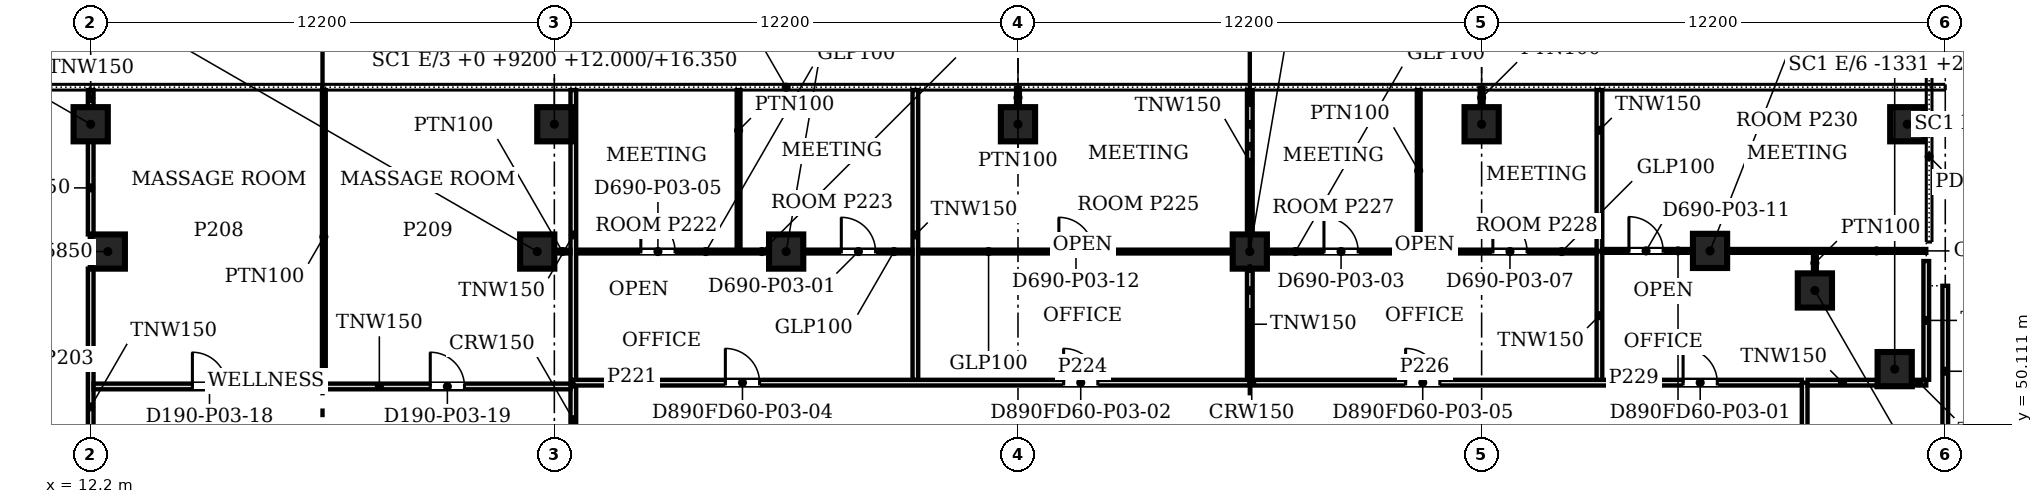
"""IFC4 building model, lengths in metres.
Left out: names, types, materials, properties, quantities, classifications, styles, units other than length and angle.
Written with IfcOpenShell. Run it as: python <this file> out.ifc"""

import sys

from ifc_helpers import new_model, si_unit, direction, frame, frame_2d, origin, origin_2d, place, context, subcontext, project, spatial, rectangle, extrude, source, transform, mapped, element, fill, save


model = new_model("IFC4")
c1 = context("Model", 3, precision=1e-05, world=origin(), true_north=direction((0.0, 1.0)))
c2 = subcontext(c1, "Body", "Model", "MODEL_VIEW")
j1 = project(units=[si_unit("LENGTHUNIT", "METRE"), si_unit("PLANEANGLEUNIT", "RADIAN")], contexts=[c1])
p1 = place(None, origin())
s1 = spatial("IfcSite", under=j1, at=p1, CompositionType="ELEMENT")
p2 = place(p1, origin())
s2 = spatial("IfcBuilding", under=s1, at=p2, CompositionType="ELEMENT")
p3 = place(p2, frame((0.0, 0.0, 12.0)))
s3 = spatial("IfcBuildingStorey", under=s2, at=p3, CompositionType="ELEMENT", Elevation=12.0)
for number, where, z_axis, x_axis in (
    (1, (12.65, 54.65, 0.0), (0.0, 0.0, 1.0), (1.0, 0.0, 0.0)),
    (2, (23.95, 54.65, 0.0), (0.0, 0.0, 1.0), (1.0, 0.0, 0.0)),
    (3, (59.669, 51.556, 0.0), (0.0, 0.0, 1.0), (1.0, 0.0, 0.0)),
    (4, (57.569, 53.626, 0.0), (0.0, 0.0, 1.0), (1.0, 0.0, 0.0)),
    (5, (54.81, 54.667, 0.0), (0.0, 0.0, 1.0), (1.0, 0.0, 0.0)),
    (6, (42.7, 54.65, 0.0), (0.0, 0.0, 1.0), (1.0, 0.0, 0.0)),
    (7, (30.5, 54.65, 0.0), (0.0, 0.0, 1.0), (1.0, 0.0, 0.0)),
):
    element("IfcColumn", number, at=place(p3, frame(where, z_axis=z_axis, x_axis=x_axis)), inside=s3, PredefinedType="COLUMN", context=c2, shape_type="SweptSolid", body=[
        extrude(rectangle(XDim=0.9, YDim=0.9, at=origin_2d()), origin(), (0.0, 0.0, 1.0), 4.6),
    ])
for number, where, z_axis, x_axis in (
    (8, (12.2, 58.0, 0.0), (0.0, 0.0, 1.0), (1.0, 0.0, 0.0)),
    (9, (24.4, 58.0, 0.0), (0.0, 0.0, 1.0), (1.0, 0.0, 0.0)),
    (10, (36.6, 58.0, 0.0), (0.0, 0.0, 1.0), (1.0, 0.0, 0.0)),
    (11, (48.8, 58.0, 0.0), (0.0, 0.0, 1.0), (1.0, 0.0, 0.0)),
    (12, (61.0, 54.2, 0.0), (0.0, 0.0, 1.0), (1.0, 0.0, 0.0)),
    (13, (60.0, 58.0, 0.0), (0.0, 0.0, 1.0), (1.0, 0.0, 0.0)),
):
    element("IfcColumn", number, at=place(p3, frame(where, z_axis=z_axis, x_axis=x_axis)), inside=s3, PredefinedType="COLUMN", context=c2, shape_type="SweptSolid", body=[
        extrude(rectangle(XDim=0.9, YDim=0.9, at=origin_2d()), origin(), (0.0, 0.0, 1.0), 4.35),
    ])
p4 = place(p3, frame((57.3, 39.1, 0.0), z_axis=(0.0, 0.0, 1.0), x_axis=(0.0, 1.0, 0.0)))
e14 = element("IfcWall", 14, at=p4, inside=s3, PredefinedType="PARTITIONING", context=c2, shape_type="SweptSolid", body=[
    extrude(rectangle(XDim=12.1, YDim=0.15, at=frame_2d((6.05, 0.0))), origin(), (0.0, 0.0, 1.0), 3.672),
])
p5 = place(p3, frame((61.0, 49.251, 0.0), z_axis=(0.0, 0.0, 1.0), x_axis=(0.0, 1.0, 0.0)))
e15 = element("IfcWall", 15, at=p5, inside=s3, PredefinedType="PARTITIONING", context=c2, shape_type="SweptSolid", body=[
    extrude(rectangle(XDim=4.498, YDim=0.15, at=frame_2d((2.249, 0.0))), origin(), (0.0, 0.0, 1.0), 3.672),
])
p6 = place(p3, frame((12.2, 49.351, 0.0), z_axis=(0.0, 0.0, 1.0), x_axis=(0.0, 1.0, 0.0)))
e16 = element("IfcWall", 16, at=p6, inside=s3, PredefinedType="PARTITIONING", context=c2, shape_type="SweptSolid", body=[
    extrude(rectangle(XDim=4.848, YDim=0.15, at=frame_2d((2.424, 0.0))), origin(), (0.0, 0.0, 1.0), 3.672),
])
p7 = place(p3, frame((24.9, 49.351, 0.0), z_axis=(0.0, 0.0, 1.0), x_axis=(0.0, 1.0, 0.0)))
e17 = element("IfcWall", 17, at=p7, inside=s3, PredefinedType="PARTITIONING", context=c2, shape_type="SweptSolid", body=[
    extrude(rectangle(XDim=1.749, YDim=0.15, at=frame_2d((0.875, 0.0))), origin(), (0.0, 0.0, 1.0), 3.672),
])
p8 = place(p3, frame((12.276, 51.1, 0.0), z_axis=(0.0, 0.0, 1.0), x_axis=(1.0, 0.0, 0.0)))
e18 = element("IfcWall", 18, at=p8, inside=s3, PredefinedType="PARTITIONING", context=c2, shape_type="SweptSolid", body=[
    extrude(rectangle(XDim=12.548, YDim=0.15, at=frame_2d((6.274, 0.0))), origin(), (0.0, 0.0, 1.0), 3.672),
])
m1 = source(origin(), c2, "Body", "SweptSolid", [
    extrude(rectangle(XDim=0.9, YDim=2.1, at=frame_2d((0.45, 1.05))), frame((0.0, 0.085, 0.0), z_axis=(0.0, -1.0, 0.0), x_axis=(1.0, 0.0, 0.0)), (0.0, 0.0, 1.0), 0.17),
])
p9 = place(p8, frame((2.6, 0.0, 0.0)))
e19 = element("IfcOpeningElement", 19, at=p9, cuts=e18, PredefinedType="OPENING", context=c2, shape_type="MappedRepresentation", body=[
    mapped(m1, transform((0.0, 0.0, 0.0), scale=1.0)),
])
p10 = place(p8, frame((8.859, 0.0, 0.0)))
e20 = element("IfcOpeningElement", 20, at=p10, cuts=e18, PredefinedType="OPENING", context=c2, shape_type="MappedRepresentation", body=[
    mapped(m1, transform((0.0, 0.0, 0.0), scale=1.0)),
])
p11 = place(p3, frame((18.335, 51.176, 0.0), z_axis=(0.0, 0.0, 1.0), x_axis=(0.0, 1.0, 0.0)))
e21 = element("IfcWall", 21, at=p11, inside=s3, PredefinedType="PARTITIONING", context=c2, shape_type="SweptSolid", body=[
    extrude(rectangle(XDim=7.724, YDim=0.1, at=frame_2d((3.862, 0.0))), origin(), (0.0, 0.0, 1.0), 3.672),
])
p12 = place(p3, frame((24.9, 51.2, 0.0), z_axis=(0.0, 0.0, 1.0), x_axis=(1.0, 0.0, 0.0)))
e22 = element("IfcWall", 22, at=p12, inside=s3, PredefinedType="PARTITIONING", context=c2, shape_type="SweptSolid", body=[
    extrude(rectangle(XDim=32.324, YDim=0.15, at=frame_2d((16.162, 0.0))), origin(), (0.0, 0.0, 1.0), 3.672),
])
p13 = place(p12, frame((29.201, 0.0, 0.0)))
e23 = element("IfcOpeningElement", 23, at=p13, cuts=e22, PredefinedType="OPENING", context=c2, shape_type="MappedRepresentation", body=[
    mapped(m1, transform((0.0, 0.0, 0.0), scale=1.0)),
])
p14 = place(p12, frame((12.901, 0.0, 0.0)))
e24 = element("IfcOpeningElement", 24, at=p14, cuts=e22, PredefinedType="OPENING", context=c2, shape_type="MappedRepresentation", body=[
    mapped(m1, transform((0.0, 0.0, 0.0), scale=1.0)),
])
p15 = place(p12, frame((4.0, 0.0, 0.0)))
e25 = element("IfcOpeningElement", 25, at=p15, cuts=e22, PredefinedType="OPENING", context=c2, shape_type="MappedRepresentation", body=[
    mapped(m1, transform((0.0, 0.0, 0.0), scale=1.0)),
])
p16 = place(p12, frame((21.9, 0.0, 0.0)))
e26 = element("IfcOpeningElement", 26, at=p16, cuts=e22, PredefinedType="OPENING", context=c2, shape_type="MappedRepresentation", body=[
    mapped(m1, transform((0.0, 0.0, 0.0), scale=1.0)),
])
p17 = place(p3, frame((57.376, 51.2, 0.0), z_axis=(0.0, 0.0, 1.0), x_axis=(1.0, 0.0, 0.0)))
e27 = element("IfcWall", 27, at=p17, inside=s3, PredefinedType="PARTITIONING", context=c2, shape_type="SweptSolid", body=[
    extrude(rectangle(XDim=1.842, YDim=0.15, at=frame_2d((0.921, 0.0))), origin(), (0.0, 0.0, 1.0), 3.672),
])
p18 = place(p3, frame((60.12, 51.2, 0.0), z_axis=(0.0, 0.0, 1.0), x_axis=(1.0, 0.0, 0.0)))
e28 = element("IfcWall", 28, at=p18, inside=s3, PredefinedType="PARTITIONING", context=c2, shape_type="SweptSolid", body=[
    extrude(rectangle(XDim=0.38, YDim=0.15, at=frame_2d((0.19, 0.0))), origin(), (0.0, 0.0, 1.0), 3.672),
])
for number, where, z_axis, x_axis in (
    (29, (24.9, 51.276, 0.0), (0.0, 0.0, 1.0), (0.0, 1.0, 0.0)),
    (30, (33.9, 51.276, 0.0), (0.0, 0.0, 1.0), (0.0, 1.0, 0.0)),
):
    element("IfcWall", number, at=place(p3, frame(where, z_axis=z_axis, x_axis=x_axis)), inside=s3, PredefinedType="PARTITIONING", context=c2, shape_type="SweptSolid", body=[
        extrude(rectangle(XDim=7.624, YDim=0.15, at=frame_2d((3.812, 0.0))), origin(), (0.0, 0.0, 1.0), 3.672),
    ])
p19 = place(p3, frame((42.7, 51.276, 0.0), z_axis=(0.0, 0.0, 1.0), x_axis=(0.0, 1.0, 0.0)))
e31 = element("IfcWall", 31, at=p19, inside=s3, PredefinedType="PARTITIONING", context=c2, shape_type="SweptSolid", body=[
    extrude(rectangle(XDim=2.923, YDim=0.15, at=frame_2d((1.461, 0.0))), origin(), (0.0, 0.0, 1.0), 3.672),
])
p20 = place(p3, frame((51.9, 51.276, 0.0), z_axis=(0.0, 0.0, 1.0), x_axis=(0.0, 1.0, 0.0)))
e32 = element("IfcWall", 32, at=p20, inside=s3, PredefinedType="PARTITIONING", context=c2, shape_type="SweptSolid", body=[
    extrude(rectangle(XDim=3.374, YDim=0.15, at=frame_2d((1.687, 0.0))), origin(), (0.0, 0.0, 1.0), 3.672),
])
p21 = place(p3, frame((60.5, 51.276, 0.0), z_axis=(0.0, 0.0, 1.0), x_axis=(0.0, 1.0, 0.0)))
e33 = element("IfcWall", 33, at=p21, inside=s3, PredefinedType="PARTITIONING", context=c2, shape_type="SweptSolid", body=[
    extrude(rectangle(XDim=3.124, YDim=0.15, at=frame_2d((1.562, 0.0))), origin(), (0.0, 0.0, 1.0), 3.672),
])
p22 = place(p3, frame((57.569, 54.076, 0.0), z_axis=(0.0, 0.0, 1.0), x_axis=(0.0, 1.0, 0.0)))
e34 = element("IfcWall", 34, at=p22, inside=s3, PredefinedType="PARTITIONING", context=c2, shape_type="SweptSolid", body=[
    extrude(rectangle(XDim=0.541, YDim=0.1, at=frame_2d((0.271, 0.0))), origin(), (0.0, 0.0, 1.0), 3.672),
])
p23 = place(p3, frame((24.4, 54.65, 0.0), z_axis=(0.0, 0.0, 1.0), x_axis=(1.0, 0.0, 0.0)))
e35 = element("IfcWall", 35, at=p23, inside=s3, PredefinedType="PARTITIONING", context=c2, shape_type="SweptSolid", body=[
    extrude(rectangle(XDim=0.425, YDim=0.1, at=frame_2d((0.212, 0.0))), origin(), (0.0, 0.0, 1.0), 3.672),
])
p24 = place(p3, frame((24.976, 54.65, 0.0), z_axis=(0.0, 0.0, 1.0), x_axis=(1.0, 0.0, 0.0)))
e36 = element("IfcWall", 36, at=p24, inside=s3, PredefinedType="PARTITIONING", context=c2, shape_type="SweptSolid", body=[
    extrude(rectangle(XDim=4.221, YDim=0.1, at=frame_2d((2.11, 0.0))), origin(), (0.0, 0.0, 1.0), 3.672),
])
m2 = source(origin(), c2, "Body", "SweptSolid", [
    extrude(rectangle(XDim=0.9, YDim=2.1, at=frame_2d((0.45, 1.05))), frame((0.0, 0.06, 0.0), z_axis=(0.0, -1.0, 0.0), x_axis=(1.0, 0.0, 0.0)), (0.0, 0.0, 1.0), 0.12),
])
p25 = place(p24, frame((1.7, 0.0, 0.0)))
e37 = element("IfcOpeningElement", 37, at=p25, cuts=e36, PredefinedType="OPENING", context=c2, shape_type="MappedRepresentation", body=[
    mapped(m2, transform((0.0, 0.0, 0.0), scale=1.0)),
])
p26 = place(p3, frame((29.248, 54.65, 0.0), z_axis=(0.0, 0.0, 1.0), x_axis=(0.0, 1.0, 0.0)))
e38 = element("IfcWall", 38, at=p26, inside=s3, PredefinedType="PARTITIONING", context=c2, shape_type="SweptSolid", body=[
    extrude(rectangle(XDim=4.25, YDim=0.1, at=frame_2d((2.125, 0.0))), origin(), (0.0, 0.0, 1.0), 3.672),
])
p27 = place(p3, frame((29.299, 54.65, 0.0), z_axis=(0.0, 0.0, 1.0), x_axis=(1.0, 0.0, 0.0)))
e39 = element("IfcWall", 39, at=p27, inside=s3, PredefinedType="PARTITIONING", context=c2, shape_type="SweptSolid", body=[
    extrude(rectangle(XDim=0.75, YDim=0.1, at=frame_2d((0.375, 0.0))), origin(), (0.0, 0.0, 1.0), 3.672),
])
p28 = place(p3, frame((30.951, 54.65, 0.0), z_axis=(0.0, 0.0, 1.0), x_axis=(1.0, 0.0, 0.0)))
e40 = element("IfcWall", 40, at=p28, inside=s3, PredefinedType="PARTITIONING", context=c2, shape_type="SweptSolid", body=[
    extrude(rectangle(XDim=2.873, YDim=0.1, at=frame_2d((1.437, 0.0))), origin(), (0.0, 0.0, 1.0), 3.672),
])
p29 = place(p28, frame((1.0, 0.0, 0.0)))
e41 = element("IfcOpeningElement", 41, at=p29, cuts=e40, PredefinedType="OPENING", context=c2, shape_type="MappedRepresentation", body=[
    mapped(m2, transform((0.0, 0.0, 0.0), scale=1.0)),
])
p30 = place(p3, frame((33.976, 54.65, 0.0), z_axis=(0.0, 0.0, 1.0), x_axis=(1.0, 0.0, 0.0)))
e42 = element("IfcWall", 42, at=p30, inside=s3, PredefinedType="PARTITIONING", context=c2, shape_type="SweptSolid", body=[
    extrude(rectangle(XDim=8.273, YDim=0.1, at=frame_2d((4.136, 0.0))), origin(), (0.0, 0.0, 1.0), 3.672),
])
p31 = place(p30, frame((3.7, 0.0, 0.0)))
e43 = element("IfcOpeningElement", 43, at=p31, cuts=e42, PredefinedType="OPENING", context=c2, shape_type="MappedRepresentation", body=[
    mapped(m2, transform((0.0, 0.0, 0.0), scale=1.0)),
])
p32 = place(p3, frame((43.151, 54.65, 0.0), z_axis=(0.0, 0.0, 1.0), x_axis=(1.0, 0.0, 0.0)))
e44 = element("IfcWall", 44, at=p32, inside=s3, PredefinedType="PARTITIONING", context=c2, shape_type="SweptSolid", body=[
    extrude(rectangle(XDim=3.943, YDim=0.1, at=frame_2d((1.971, 0.0))), origin(), (0.0, 0.0, 1.0), 3.672),
])
p33 = place(p32, frame((1.5, 0.0, 0.0)))
e45 = element("IfcOpeningElement", 45, at=p33, cuts=e44, PredefinedType="OPENING", context=c2, shape_type="MappedRepresentation", body=[
    mapped(m2, transform((0.0, 0.0, 0.0), scale=1.0)),
])
p34 = place(p3, frame((47.144, 54.65, 0.0), z_axis=(0.0, 0.0, 1.0), x_axis=(0.0, 1.0, 0.0)))
e46 = element("IfcWall", 46, at=p34, inside=s3, PredefinedType="PARTITIONING", context=c2, shape_type="SweptSolid", body=[
    extrude(rectangle(XDim=4.25, YDim=0.1, at=frame_2d((2.125, 0.0))), origin(), (0.0, 0.0, 1.0), 3.672),
])
p35 = place(p3, frame((47.195, 54.65, 0.0), z_axis=(0.0, 0.0, 1.0), x_axis=(1.0, 0.0, 0.0)))
e47 = element("IfcWall", 47, at=p35, inside=s3, PredefinedType="PARTITIONING", context=c2, shape_type="SweptSolid", body=[
    extrude(rectangle(XDim=4.629, YDim=0.1, at=frame_2d((2.314, 0.0))), origin(), (0.0, 0.0, 1.0), 3.672),
])
p36 = place(p35, frame((1.9, 0.0, 0.0)))
e48 = element("IfcOpeningElement", 48, at=p36, cuts=e47, PredefinedType="OPENING", context=c2, shape_type="MappedRepresentation", body=[
    mapped(m2, transform((0.0, 0.0, 0.0), scale=1.0)),
])
p37 = place(p3, frame((51.9, 54.667, 0.0), z_axis=(0.0, 0.0, 1.0), x_axis=(0.0, 1.0, 0.0)))
e49 = element("IfcWall", 49, at=p37, inside=s3, PredefinedType="PARTITIONING", context=c2, shape_type="SweptSolid", body=[
    extrude(rectangle(XDim=4.233, YDim=0.15, at=frame_2d((2.116, 0.0))), origin(), (0.0, 0.0, 1.0), 3.672),
])
p38 = place(p3, frame((51.976, 54.667, 0.0), z_axis=(0.0, 0.0, 1.0), x_axis=(1.0, 0.0, 0.0)))
e50 = element("IfcWall", 50, at=p38, inside=s3, PredefinedType="PARTITIONING", context=c2, shape_type="SweptSolid", body=[
    extrude(rectangle(XDim=2.383, YDim=0.1, at=frame_2d((1.191, 0.0))), origin(), (0.0, 0.0, 1.0), 3.672),
])
p39 = place(p38, frame((0.7, 0.0, 0.0)))
e51 = element("IfcOpeningElement", 51, at=p39, cuts=e50, PredefinedType="OPENING", context=c2, shape_type="MappedRepresentation", body=[
    mapped(m2, transform((0.0, 0.0, 0.0), scale=1.0)),
])
p40 = place(p3, frame((55.261, 54.667, 0.0), z_axis=(0.0, 0.0, 1.0), x_axis=(1.0, 0.0, 0.0)))
e52 = element("IfcWall", 52, at=p40, inside=s3, PredefinedType="PARTITIONING", context=c2, shape_type="SweptSolid", body=[
    extrude(rectangle(XDim=5.239, YDim=0.1, at=frame_2d((2.62, 0.0))), origin(), (0.0, 0.0, 1.0), 3.672),
])
p41 = place(p3, frame((12.2, 55.101, 0.0), z_axis=(0.0, 0.0, 1.0), x_axis=(0.0, 1.0, 0.0)))
e53 = element("IfcWall", 53, at=p41, inside=s3, PredefinedType="PARTITIONING", context=c2, shape_type="SweptSolid", body=[
    extrude(rectangle(XDim=2.448, YDim=0.15, at=frame_2d((1.224, 0.0))), origin(), (0.0, 0.0, 1.0), 3.672),
])
p42 = place(p3, frame((42.7, 55.101, 0.0), z_axis=(0.0, 0.0, 1.0), x_axis=(0.0, 1.0, 0.0)))
e54 = element("IfcWall", 54, at=p42, inside=s3, PredefinedType="PARTITIONING", context=c2, shape_type="SweptSolid", body=[
    extrude(rectangle(XDim=3.799, YDim=0.15, at=frame_2d((1.899, 0.0))), origin(), (0.0, 0.0, 1.0), 3.672),
])
p43 = place(p3, frame((12.2, 58.451, 0.0), z_axis=(0.0, 0.0, 1.0), x_axis=(0.0, 1.0, 0.0)))
e55 = element("IfcWall", 55, at=p43, inside=s3, PredefinedType="PARTITIONING", context=c2, shape_type="SweptSolid", body=[
    extrude(rectangle(XDim=0.449, YDim=0.15, at=frame_2d((0.225, 0.0))), origin(), (0.0, 0.0, 1.0), 3.672),
])
for number, where, z_axis, x_axis in (
    (56, (36.6, 58.45, 0.0), (0.0, 0.0, 1.0), (0.0, 1.0, 0.0)),
    (57, (48.8, 58.45, 0.0), (0.0, 0.0, 1.0), (0.0, 1.0, 0.0)),
):
    element("IfcWall", number, at=place(p3, frame(where, z_axis=z_axis, x_axis=x_axis)), inside=s3, PredefinedType="PARTITIONING", context=c2, shape_type="SweptSolid", body=[
        extrude(rectangle(XDim=0.5, YDim=0.1, at=frame_2d((0.25, 0.0))), origin(), (0.0, 0.0, 1.0), 3.672),
    ])
m3 = source(origin(), c2, "Body", "SweptSolid", [
    extrude(rectangle(XDim=0.9, YDim=2.1, at=frame_2d((0.45, 1.05))), frame((0.0, 0.025, 0.0), z_axis=(0.0, -1.0, 0.0), x_axis=(1.0, 0.0, 0.0)), (0.0, 0.0, 1.0), 0.05),
])
p44 = place(p29, origin())
e58 = element("IfcDoor", 58, at=p44, inside=s3, OperationType="SINGLE_SWING_LEFT", PredefinedType="DOOR", context=c2, shape_type="MappedRepresentation", body=[
    mapped(m3, transform((0.0, 0.0, 0.0), scale=1.0)),
])
fill(e41, e58)
p45 = place(p33, origin())
e59 = element("IfcDoor", 59, at=p45, inside=s3, OperationType="SINGLE_SWING_LEFT", PredefinedType="DOOR", context=c2, shape_type="MappedRepresentation", body=[
    mapped(m3, transform((0.0, 0.0, 0.0), scale=1.0)),
])
fill(e45, e59)
p46 = place(p25, origin())
e60 = element("IfcDoor", 60, at=p46, inside=s3, OperationType="SINGLE_SWING_LEFT", PredefinedType="DOOR", context=c2, shape_type="MappedRepresentation", body=[
    mapped(m3, transform((0.0, 0.0, 0.0), scale=1.0)),
])
fill(e37, e60)
p47 = place(p36, origin())
e61 = element("IfcDoor", 61, at=p47, inside=s3, OperationType="SINGLE_SWING_LEFT", PredefinedType="DOOR", context=c2, shape_type="MappedRepresentation", body=[
    mapped(m3, transform((0.0, 0.0, 0.0), scale=1.0)),
])
fill(e48, e61)
p48 = place(p13, origin())
e62 = element("IfcDoor", 62, at=p48, inside=s3, OperationType="SINGLE_SWING_LEFT", PredefinedType="DOOR", context=c2, shape_type="MappedRepresentation", body=[
    mapped(m3, transform((0.0, 0.0, 0.0), scale=1.0)),
])
fill(e23, e62)
p49 = place(p9, origin())
e63 = element("IfcDoor", 63, at=p49, inside=s3, OperationType="SINGLE_SWING_LEFT", PredefinedType="DOOR", context=c2, shape_type="MappedRepresentation", body=[
    mapped(m3, transform((0.0, 0.0, 0.0), scale=1.0)),
])
fill(e19, e63)
p50 = place(p10, origin())
e64 = element("IfcDoor", 64, at=p50, inside=s3, OperationType="SINGLE_SWING_LEFT", PredefinedType="DOOR", context=c2, shape_type="MappedRepresentation", body=[
    mapped(m3, transform((0.0, 0.0, 0.0), scale=1.0)),
])
fill(e20, e64)
p51 = place(p39, origin())
e65 = element("IfcDoor", 65, at=p51, inside=s3, OperationType="SINGLE_SWING_LEFT", PredefinedType="DOOR", context=c2, shape_type="MappedRepresentation", body=[
    mapped(m3, transform((0.0, 0.0, 0.0), scale=1.0)),
])
fill(e51, e65)
p52 = place(p31, origin())
e66 = element("IfcDoor", 66, at=p52, inside=s3, OperationType="SINGLE_SWING_LEFT", PredefinedType="DOOR", context=c2, shape_type="MappedRepresentation", body=[
    mapped(m3, transform((0.0, 0.0, 0.0), scale=1.0)),
])
fill(e43, e66)
p53 = place(p14, origin())
e67 = element("IfcDoor", 67, at=p53, inside=s3, OperationType="SINGLE_SWING_LEFT", PredefinedType="DOOR", context=c2, shape_type="MappedRepresentation", body=[
    mapped(m3, transform((0.0, 0.0, 0.0), scale=1.0)),
])
fill(e24, e67)
p54 = place(p15, origin())
e68 = element("IfcDoor", 68, at=p54, inside=s3, OperationType="SINGLE_SWING_LEFT", PredefinedType="DOOR", context=c2, shape_type="MappedRepresentation", body=[
    mapped(m3, transform((0.0, 0.0, 0.0), scale=1.0)),
])
fill(e25, e68)
p55 = place(p16, origin())
e69 = element("IfcDoor", 69, at=p55, inside=s3, OperationType="SINGLE_SWING_LEFT", PredefinedType="DOOR", context=c2, shape_type="MappedRepresentation", body=[
    mapped(m3, transform((0.0, 0.0, 0.0), scale=1.0)),
])
fill(e26, e69)
save(model, sys.argv[1])
